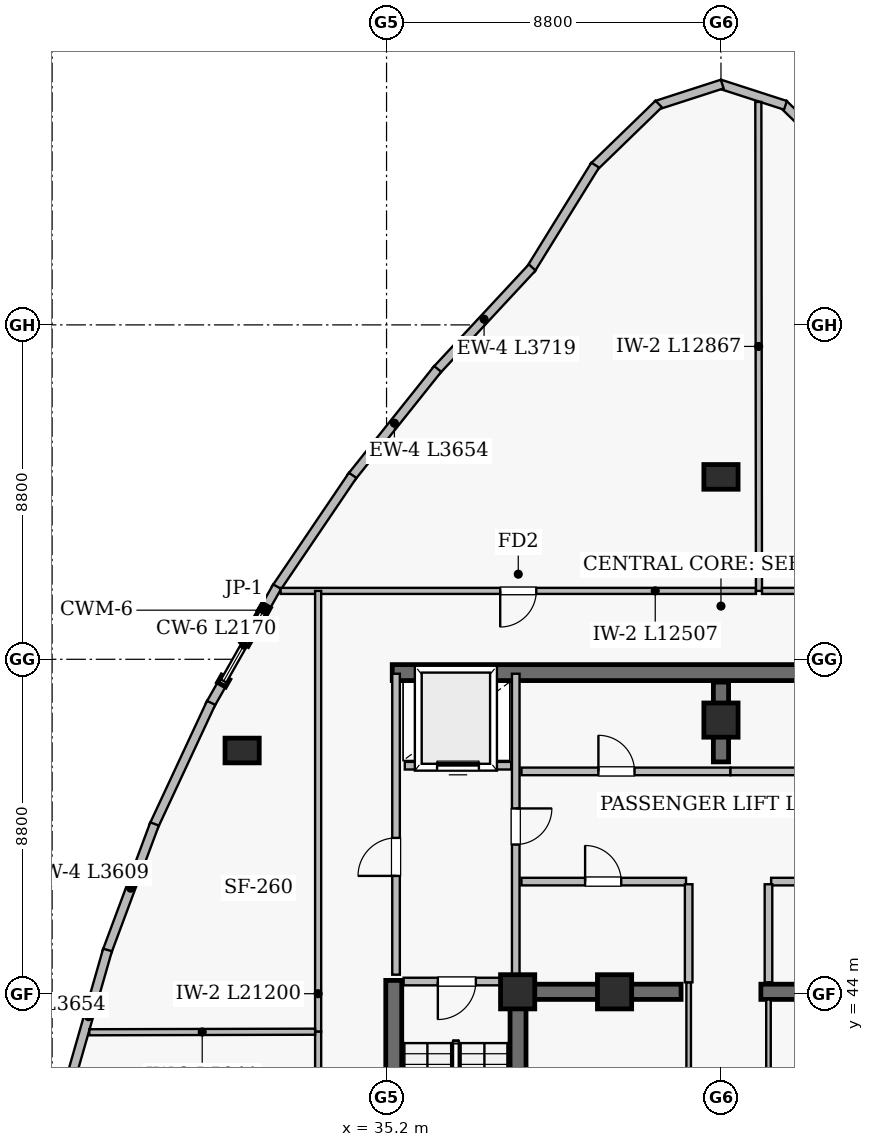
"""IFC4 building model, lengths in metres.
Left out: names, types, materials, properties, quantities, classifications, styles, units other than length and angle.
Written with IfcOpenShell. Run it as: python <this file> out.ifc"""

import sys

from ifc_helpers import new_model, si_unit, direction, frame, frame_2d, origin, origin_2d, place, context, subcontext, project, spatial, rectangle, extrude, element, fill, save


model = new_model("IFC4")
c1 = context("Model", 3, precision=1e-05, world=origin(), true_north=direction((0.0, 1.0)))
c2 = subcontext(c1, "Body", "Model", "MODEL_VIEW")
j1 = project(units=[si_unit("LENGTHUNIT", "METRE"), si_unit("PLANEANGLEUNIT", "RADIAN")], contexts=[c1])
p1 = place(None, origin())
s1 = spatial("IfcSite", under=j1, at=p1, CompositionType="ELEMENT")
p2 = place(p1, origin())
s2 = spatial("IfcBuilding", under=s1, at=p2, CompositionType="ELEMENT")
p3 = place(p2, frame((0.0, 0.0, 306.8)))
s3 = spatial("IfcBuildingStorey", under=s2, at=p3, CompositionType="ELEMENT", Elevation=306.8)
p4 = place(p3, frame((35.35, 52.45, 0.0), z_axis=(0.0, 0.0, 1.0), x_axis=(1.0, 0.0, 0.0)))
e1 = element("IfcWall", 1, at=p4, inside=s3, PredefinedType="SHEAR", context=c2, shape_type="SweptSolid", body=[
    extrude(rectangle(XDim=17.3, YDim=0.42, at=frame_2d((8.65, 0.0))), origin(), (0.0, 0.0, 1.0), 5.74),
])
p5 = place(p3, frame((35.39, 35.18, 0.0), z_axis=(0.0, 0.0, 1.0), x_axis=(0.0, 1.0, 0.0)))
e2 = element("IfcWall", 2, at=p5, inside=s3, PredefinedType="SHEAR", context=c2, shape_type="SweptSolid", body=[
    extrude(rectangle(XDim=9.17, YDim=0.42, at=frame_2d((4.585, 0.0))), origin(), (0.0, 0.0, 1.0), 5.74),
])
p6 = place(p3, frame((38.66, 35.4, 0.0), z_axis=(0.0, 0.0, 1.0), x_axis=(0.0, 1.0, 0.0)))
e3 = element("IfcWall", 3, at=p6, inside=s3, PredefinedType="SHEAR", context=c2, shape_type="SweptSolid", body=[
    extrude(rectangle(XDim=8.95, YDim=0.42, at=frame_2d((4.475, 0.0))), origin(), (0.0, 0.0, 1.0), 5.74),
])
p7 = place(p3, frame((44.0, 50.1, 0.0), z_axis=(0.0, 0.0, 1.0), x_axis=(0.0, 1.0, 0.0)))
e4 = element("IfcWall", 4, at=p7, inside=s3, PredefinedType="SHEAR", context=c2, shape_type="SweptSolid", body=[
    extrude(rectangle(XDim=2.1, YDim=0.4, at=frame_2d((1.05, 0.0))), origin(), (0.0, 0.0, 1.0), 5.74),
])
for number, where, z_axis, x_axis in (
    (5, (38.75, 44.05, 0.0), (0.0, 0.0, 1.0), (1.0, 0.0, 0.0)),
    (6, (45.05, 44.05, 0.0), (0.0, 0.0, 1.0), (1.0, 0.0, 0.0)),
):
    element("IfcWall", number, at=place(p3, frame(where, z_axis=z_axis, x_axis=x_axis)), inside=s3, PredefinedType="SHEAR", context=c2, shape_type="SweptSolid", body=[
        extrude(rectangle(XDim=4.2, YDim=0.4, at=frame_2d((2.1, 0.0))), origin(), (0.0, 0.0, 1.0), 5.74),
    ])
for number, where, z_axis, x_axis in (
    (7, (38.65, 44.05, 0.0), (0.0, 0.0, 1.0), (1.0, 0.0, 0.0)),
    (8, (44.0, 51.2, 0.0), (0.0, 0.0, 1.0), (1.0, 0.0, 0.0)),
    (9, (41.2, 44.05, 0.0), (0.0, 0.0, 1.0), (1.0, 0.0, 0.0)),
):
    element("IfcColumn", number, at=place(p3, frame(where, z_axis=z_axis, x_axis=x_axis)), inside=s3, PredefinedType="COLUMN", context=c2, shape_type="SweptSolid", body=[
        extrude(rectangle(XDim=0.9, YDim=0.9, at=origin_2d()), origin(), (0.0, 0.0, 1.0), 6.0),
    ])
for number, where, z_axis, x_axis in (
    (10, (44.0, 57.6, 0.0), (0.0, 0.0, 1.0), (1.0, 0.0, 0.0)),
    (11, (31.4, 50.4, 0.0), (0.0, 0.0, 1.0), (1.0, 0.0, 0.0)),
):
    element("IfcColumn", number, at=place(p3, frame(where, z_axis=z_axis, x_axis=x_axis)), inside=s3, PredefinedType="COLUMN", context=c2, shape_type="SweptSolid", body=[
        extrude(rectangle(XDim=0.9, YDim=0.65, at=origin_2d()), origin(), (0.0, 0.0, 1.0), 6.0),
    ])
p8 = place(p3, frame((47.352, 65.751, 0.0), z_axis=(0.0, 0.0, 1.0), x_axis=(-0.717711443968, 0.69634063733, 0.0)))
e12 = element("IfcWall", 12, at=p8, inside=s3, PredefinedType="SOLIDWALL", context=c2, shape_type="SweptSolid", body=[
    extrude(rectangle(XDim=2.388, YDim=0.24, at=frame_2d((1.194, 0.0))), origin(), (0.0, 0.0, 1.0), 5.74),
])
for number, where, z_axis, x_axis in (
    (13, (45.697, 67.378, 0.0), (0.0, 0.0, 1.0), (-0.952, 0.308, 0.0)),
    (14, (44.033, 67.938, 0.0), (0.0, 0.0, 1.0), (-0.952, -0.308, 0.0)),
):
    element("IfcWall", number, at=place(p3, frame(where, z_axis=z_axis, x_axis=x_axis)), inside=s3, PredefinedType="SOLIDWALL", context=c2, shape_type="SweptSolid", body=[
        extrude(rectangle(XDim=1.818, YDim=0.24, at=frame_2d((0.909, 0.0))), origin(), (0.0, 0.0, 1.0), 5.74),
    ])
p9 = place(p3, frame((42.361, 67.414, 0.0), z_axis=(0.0, 0.0, 1.0), x_axis=(-0.717711443968, -0.69634063733, 0.0)))
e15 = element("IfcWall", 15, at=p9, inside=s3, PredefinedType="SOLIDWALL", context=c2, shape_type="SweptSolid", body=[
    extrude(rectangle(XDim=2.388, YDim=0.24, at=frame_2d((1.194, 0.0))), origin(), (0.0, 0.0, 1.0), 5.74),
])
p10 = place(p3, frame((40.691, 65.805, 0.0), z_axis=(0.0, 0.0, 1.0), x_axis=(-0.526110187608, -0.850416410058, 0.0)))
e16 = element("IfcWall", 16, at=p10, inside=s3, PredefinedType="SOLIDWALL", context=c2, shape_type="SweptSolid", body=[
    extrude(rectangle(XDim=3.233, YDim=0.24, at=frame_2d((1.616, 0.0))), origin(), (0.0, 0.0, 1.0), 5.74),
])
p11 = place(p3, frame((39.033, 63.112, 0.0), z_axis=(0.0, 0.0, 1.0), x_axis=(-0.68087147599, -0.732402917241, 0.0)))
e17 = element("IfcWall", 17, at=p11, inside=s3, PredefinedType="SOLIDWALL", context=c2, shape_type="SweptSolid", body=[
    extrude(rectangle(XDim=3.719, YDim=0.24, at=frame_2d((1.859, 0.0))), origin(), (0.0, 0.0, 1.0), 5.74),
])
p12 = place(p3, frame((36.546, 60.441, 0.0), z_axis=(0.0, 0.0, 1.0), x_axis=(-0.623626980574, -0.781722066402, 0.0)))
e18 = element("IfcWall", 18, at=p12, inside=s3, PredefinedType="SOLIDWALL", context=c2, shape_type="SweptSolid", body=[
    extrude(rectangle(XDim=3.654, YDim=0.24, at=frame_2d((1.827, 0.0))), origin(), (0.0, 0.0, 1.0), 5.74),
])
p13 = place(p3, frame((34.309, 57.641, 0.0), z_axis=(0.0, 0.0, 1.0), x_axis=(-0.560819727484, -0.827937940467, 0.0)))
e19 = element("IfcWall", 19, at=p13, inside=s3, PredefinedType="SOLIDWALL", context=c2, shape_type="SweptSolid", body=[
    extrude(rectangle(XDim=3.609, YDim=0.24, at=frame_2d((1.805, 0.0))), origin(), (0.0, 0.0, 1.0), 5.74),
])
p14 = place(p3, frame((32.322, 54.712, 0.0), z_axis=(0.0, 0.0, 1.0), x_axis=(-0.493563037143, -0.869710025449, 0.0)))
e20 = element("IfcWall", 20, at=p14, inside=s3, PredefinedType="SOLIDWALL", context=c2, shape_type="SweptSolid", body=[
    extrude(rectangle(XDim=0.705, YDim=0.24, at=frame_2d((0.353, 0.0))), origin(), (0.0, 0.0, 1.0), 5.74),
])
p15 = place(p3, frame((30.923, 52.246, 0.0), z_axis=(0.0, 0.0, 1.0), x_axis=(-0.49347941801, -0.869757474242, 0.0)))
e21 = element("IfcWall", 21, at=p15, inside=s3, PredefinedType="SOLIDWALL", context=c2, shape_type="SweptSolid", body=[
    extrude(rectangle(XDim=0.752, YDim=0.24, at=frame_2d((0.376, 0.0))), origin(), (0.0, 0.0, 1.0), 5.74),
])
p16 = place(p3, frame((30.584, 51.654, 0.0), z_axis=(0.0, 0.0, 1.0), x_axis=(-0.422322757118, -0.906445524464, 0.0)))
e22 = element("IfcWall", 22, at=p16, inside=s3, PredefinedType="SOLIDWALL", context=c2, shape_type="SweptSolid", body=[
    extrude(rectangle(XDim=3.587, YDim=0.24, at=frame_2d((1.793, 0.0))), origin(), (0.0, 0.0, 1.0), 5.74),
])
p17 = place(p3, frame((29.096, 48.467, 0.0), z_axis=(0.0, 0.0, 1.0), x_axis=(-0.349054279873, -0.937102507574, 0.0)))
e23 = element("IfcWall", 23, at=p17, inside=s3, PredefinedType="SOLIDWALL", context=c2, shape_type="SweptSolid", body=[
    extrude(rectangle(XDim=3.609, YDim=0.24, at=frame_2d((1.805, 0.0))), origin(), (0.0, 0.0, 1.0), 5.74),
])
p18 = place(p3, frame((27.858, 45.152, 0.0), z_axis=(0.0, 0.0, 1.0), x_axis=(-0.274897629025, -0.961473501224, 0.0)))
e24 = element("IfcWall", 24, at=p18, inside=s3, PredefinedType="SOLIDWALL", context=c2, shape_type="SweptSolid", body=[
    extrude(rectangle(XDim=3.654, YDim=0.24, at=frame_2d((1.827, 0.0))), origin(), (0.0, 0.0, 1.0), 5.74),
])
p19 = place(p3, frame((44.92, 54.6, 0.0), z_axis=(0.0, 0.0, 1.0), x_axis=(-1.0, 0.0, 0.0)))
e25 = element("IfcWall", 25, at=p19, inside=s3, PredefinedType="SOLIDWALL", context=c2, shape_type="SweptSolid", body=[
    extrude(rectangle(XDim=12.507, YDim=0.16, at=frame_2d((6.253, 0.0))), origin(), (0.0, 0.0, 1.0), 4.828),
])
p20 = place(p19, frame((5.779, 0.0, 0.0)))
e26 = element("IfcOpeningElement", 26, at=p20, cuts=e25, PredefinedType="OPENING", context=c2, shape_type="SweptSolid", body=[
    extrude(rectangle(XDim=0.95, YDim=2.15, at=frame_2d((0.475, 1.075))), frame((0.0, 0.09, 0.0), z_axis=(0.0, -1.0, 0.0), x_axis=(1.0, 0.0, 0.0)), (0.0, 0.0, 1.0), 0.18),
])
p21 = place(p3, frame((43.15, 35.6, 0.0), z_axis=(0.0, 0.0, 1.0), x_axis=(0.0, 1.0, 0.0)))
e27 = element("IfcWall", 27, at=p21, inside=s3, PredefinedType="PARTITIONING", context=c2, shape_type="SweptSolid", body=[
    extrude(rectangle(XDim=8.7, YDim=0.12, at=frame_2d((4.35, 0.0))), origin(), (0.0, 0.0, 1.0), 5.74),
])
p22 = place(p21, frame((3.625, 0.0, 0.0)))
e28 = element("IfcOpeningElement", 28, at=p22, cuts=e27, PredefinedType="OPENING", context=c2, shape_type="SweptSolid", body=[
    extrude(rectangle(XDim=0.95, YDim=2.1, at=frame_2d((0.475, 1.05))), frame((0.0, 0.07, 0.0), z_axis=(0.0, -1.0, 0.0), x_axis=(1.0, 0.0, 0.0)), (0.0, 0.0, 1.0), 0.14),
])
p23 = place(p3, frame((45.25, 35.6, 0.0), z_axis=(0.0, 0.0, 1.0), x_axis=(0.0, 1.0, 0.0)))
e29 = element("IfcWall", 29, at=p23, inside=s3, PredefinedType="PARTITIONING", context=c2, shape_type="SweptSolid", body=[
    extrude(rectangle(XDim=8.25, YDim=0.12, at=frame_2d((4.125, 0.0))), origin(), (0.0, 0.0, 1.0), 5.74),
])
p24 = place(p23, frame((3.625, 0.0, 0.0)))
e30 = element("IfcOpeningElement", 30, at=p24, cuts=e29, PredefinedType="OPENING", context=c2, shape_type="SweptSolid", body=[
    extrude(rectangle(XDim=0.95, YDim=2.1, at=frame_2d((0.475, 1.05))), frame((0.0, 0.07, 0.0), z_axis=(0.0, -1.0, 0.0), x_axis=(1.0, 0.0, 0.0)), (0.0, 0.0, 1.0), 0.14),
])
p25 = place(p3, frame((35.45, 44.5, 0.0), z_axis=(0.0, 0.0, 1.0), x_axis=(0.0, 1.0, 0.0)))
e31 = element("IfcWall", 31, at=p25, inside=s3, PredefinedType="SOLIDWALL", context=c2, shape_type="SweptSolid", body=[
    extrude(rectangle(XDim=7.92, YDim=0.2, at=frame_2d((3.96, 0.0))), origin(), (0.0, 0.0, 1.0), 5.74),
])
p26 = place(p25, frame((2.6, 0.0, 0.0)))
e32 = element("IfcOpeningElement", 32, at=p26, cuts=e31, PredefinedType="OPENING", context=c2, shape_type="SweptSolid", body=[
    extrude(rectangle(XDim=1.0, YDim=2.15, at=frame_2d((0.5, 1.075))), frame((0.0, 0.11, 0.0), z_axis=(0.0, -1.0, 0.0), x_axis=(1.0, 0.0, 0.0)), (0.0, 0.0, 1.0), 0.22),
])
p27 = place(p3, frame((38.6, 44.5, 0.0), z_axis=(0.0, 0.0, 1.0), x_axis=(0.0, 1.0, 0.0)))
e33 = element("IfcWall", 33, at=p27, inside=s3, PredefinedType="SOLIDWALL", context=c2, shape_type="SweptSolid", body=[
    extrude(rectangle(XDim=7.92, YDim=0.2, at=frame_2d((3.96, 0.0))), origin(), (0.0, 0.0, 1.0), 5.74),
])
p28 = place(p27, frame((3.425, 0.0, 0.0)))
e34 = element("IfcOpeningElement", 34, at=p28, cuts=e33, PredefinedType="OPENING", context=c2, shape_type="SweptSolid", body=[
    extrude(rectangle(XDim=0.95, YDim=2.15, at=frame_2d((0.475, 1.075))), frame((0.0, 0.11, 0.0), z_axis=(0.0, -1.0, 0.0), x_axis=(1.0, 0.0, 0.0)), (0.0, 0.0, 1.0), 0.22),
])
p29 = place(p3, frame((38.75, 49.85, 0.0), z_axis=(0.0, 0.0, 1.0), x_axis=(1.0, 0.0, 0.0)))
e35 = element("IfcWall", 35, at=p29, inside=s3, PredefinedType="SOLIDWALL", context=c2, shape_type="SweptSolid", body=[
    extrude(rectangle(XDim=5.5, YDim=0.2, at=frame_2d((2.75, 0.0))), origin(), (0.0, 0.0, 1.0), 5.74),
])
p30 = place(p29, frame((2.025, 0.0, 0.0)))
e36 = element("IfcOpeningElement", 36, at=p30, cuts=e35, PredefinedType="OPENING", context=c2, shape_type="SweptSolid", body=[
    extrude(rectangle(XDim=0.95, YDim=2.15, at=frame_2d((0.475, 1.075))), frame((0.0, 0.11, 0.0), z_axis=(0.0, -1.0, 0.0), x_axis=(1.0, 0.0, 0.0)), (0.0, 0.0, 1.0), 0.22),
])
p31 = place(p3, frame((44.25, 49.85, 0.0), z_axis=(0.0, 0.0, 1.0), x_axis=(1.0, 0.0, 0.0)))
e37 = element("IfcWall", 37, at=p31, inside=s3, PredefinedType="SOLIDWALL", context=c2, shape_type="SweptSolid", body=[
    extrude(rectangle(XDim=5.0, YDim=0.2, at=frame_2d((2.5, 0.0))), origin(), (0.0, 0.0, 1.0), 4.828),
])
p32 = place(p31, frame((2.025, 0.0, 0.0)))
e38 = element("IfcOpeningElement", 38, at=p32, cuts=e37, PredefinedType="OPENING", context=c2, shape_type="SweptSolid", body=[
    extrude(rectangle(XDim=0.95, YDim=2.15, at=frame_2d((0.475, 1.075))), frame((0.0, 0.11, 0.0), z_axis=(0.0, -1.0, 0.0), x_axis=(1.0, 0.0, 0.0)), (0.0, 0.0, 1.0), 0.22),
])
p33 = place(p3, frame((38.75, 46.95, 0.0), z_axis=(0.0, 0.0, 1.0), x_axis=(1.0, 0.0, 0.0)))
e39 = element("IfcWall", 39, at=p33, inside=s3, PredefinedType="SOLIDWALL", context=c2, shape_type="SweptSolid", body=[
    extrude(rectangle(XDim=4.33, YDim=0.2, at=frame_2d((2.165, 0.0))), origin(), (0.0, 0.0, 1.0), 5.74),
])
p34 = place(p33, frame((1.675, 0.0, 0.0)))
e40 = element("IfcOpeningElement", 40, at=p34, cuts=e39, PredefinedType="OPENING", context=c2, shape_type="SweptSolid", body=[
    extrude(rectangle(XDim=0.95, YDim=2.1, at=frame_2d((0.475, 1.05))), frame((0.0, 0.11, 0.0), z_axis=(0.0, -1.0, 0.0), x_axis=(1.0, 0.0, 0.0)), (0.0, 0.0, 1.0), 0.22),
])
p35 = place(p3, frame((45.32, 46.95, 0.0), z_axis=(0.0, 0.0, 1.0), x_axis=(1.0, 0.0, 0.0)))
e41 = element("IfcWall", 41, at=p35, inside=s3, PredefinedType="SOLIDWALL", context=c2, shape_type="SweptSolid", body=[
    extrude(rectangle(XDim=3.93, YDim=0.2, at=frame_2d((1.965, 0.0))), origin(), (0.0, 0.0, 1.0), 4.828),
])
p36 = place(p35, frame((1.475, 0.0, 0.0)))
e42 = element("IfcOpeningElement", 42, at=p36, cuts=e41, PredefinedType="OPENING", context=c2, shape_type="SweptSolid", body=[
    extrude(rectangle(XDim=0.95, YDim=2.1, at=frame_2d((0.475, 1.05))), frame((0.0, 0.11, 0.0), z_axis=(0.0, -1.0, 0.0), x_axis=(1.0, 0.0, 0.0)), (0.0, 0.0, 1.0), 0.22),
])
p37 = place(p3, frame((35.65, 44.32, 0.0), z_axis=(0.0, 0.0, 1.0), x_axis=(1.0, 0.0, 0.0)))
e43 = element("IfcWall", 43, at=p37, inside=s3, PredefinedType="SOLIDWALL", context=c2, shape_type="SweptSolid", body=[
    extrude(rectangle(XDim=2.8, YDim=0.2, at=frame_2d((1.4, 0.0))), origin(), (0.0, 0.0, 1.0), 5.74),
])
p38 = place(p37, frame((0.9, 0.0, 0.0)))
e44 = element("IfcOpeningElement", 44, at=p38, cuts=e43, PredefinedType="OPENING", context=c2, shape_type="SweptSolid", body=[
    extrude(rectangle(XDim=1.0, YDim=2.15, at=frame_2d((0.5, 1.075))), frame((0.0, 0.11, 0.0), z_axis=(0.0, -1.0, 0.0), x_axis=(1.0, 0.0, 0.0)), (0.0, 0.0, 1.0), 0.22),
])
p39 = place(p3, frame((35.68, 50.0, 0.0), z_axis=(0.0, 0.0, 1.0), x_axis=(1.0, 0.0, 0.0)))
e45 = element("IfcWall", 45, at=p39, inside=s3, PredefinedType="SOLIDWALL", context=c2, shape_type="SweptSolid", body=[
    extrude(rectangle(XDim=2.8, YDim=0.2, at=frame_2d((1.4, 0.0))), origin(), (0.0, 0.0, 1.0), 5.74),
])
p40 = place(p39, frame((0.85, 0.0, 0.0)))
e46 = element("IfcOpeningElement", 46, at=p40, cuts=e45, PredefinedType="OPENING", context=c2, shape_type="SweptSolid", body=[
    extrude(rectangle(XDim=1.1, YDim=2.15, at=frame_2d((0.55, 1.075))), frame((0.0, 0.11, 0.0), z_axis=(0.0, -1.0, 0.0), x_axis=(1.0, 0.0, 0.0)), (0.0, 0.0, 1.0), 0.22),
])
p41 = place(p3, frame((45.0, 54.6, 0.0), z_axis=(0.0, 0.0, 1.0), x_axis=(-0.001328196464, 0.999999117947, 0.0)))
e47 = element("IfcWall", 47, at=p41, inside=s3, PredefinedType="SOLIDWALL", context=c2, shape_type="SweptSolid", body=[
    extrude(rectangle(XDim=12.867, YDim=0.16, at=frame_2d((6.434, 0.0))), origin(), (0.0, 0.0, 1.0), 4.828),
])
p42 = place(p3, frame((33.4, 54.6, 0.0), z_axis=(0.0, 0.0, 1.0), x_axis=(0.0, -1.0, 0.0)))
e48 = element("IfcWall", 48, at=p42, inside=s3, PredefinedType="SOLIDWALL", context=c2, shape_type="SweptSolid", body=[
    extrude(rectangle(XDim=11.6, YDim=0.16, at=frame_2d((5.8, 0.0))), origin(), (0.0, 0.0, 1.0), 4.828),
])
p43 = place(p3, frame((33.4, 43.0, 0.0), z_axis=(0.0, 0.0, 1.0), x_axis=(0.0, -1.0, 0.0)))
e49 = element("IfcWall", 49, at=p43, inside=s3, PredefinedType="SOLIDWALL", context=c2, shape_type="SweptSolid", body=[
    extrude(rectangle(XDim=9.6, YDim=0.16, at=frame_2d((4.8, 0.0))), origin(), (0.0, 0.0, 1.0), 4.828),
])
p44 = place(p3, frame((52.47, 54.6, 0.0), z_axis=(0.0, 0.0, 1.0), x_axis=(-1.0, 0.0, 0.0)))
e50 = element("IfcWall", 50, at=p44, inside=s3, PredefinedType="SOLIDWALL", context=c2, shape_type="SweptSolid", body=[
    extrude(rectangle(XDim=7.39, YDim=0.16, at=frame_2d((3.695, 0.0))), origin(), (0.0, 0.0, 1.0), 4.828),
])
p45 = place(p3, frame((33.32, 43.0, 0.0), z_axis=(0.0, 0.0, 1.0), x_axis=(-0.999996858298, -0.00250666975, 0.0)))
e51 = element("IfcWall", 51, at=p45, inside=s3, PredefinedType="SOLIDWALL", context=c2, shape_type="SweptSolid", body=[
    extrude(rectangle(XDim=5.941, YDim=0.16, at=frame_2d((2.971, 0.0))), origin(), (0.0, 0.0, 1.0), 4.828),
])
for number, where, z_axis, x_axis in (
    (52, (43.15, 44.3, 0.0), (0.0, 0.0, 1.0), (0.0, 1.0, 0.0)),
    (53, (45.25, 44.3, 0.0), (0.0, 0.0, 1.0), (0.0, 1.0, 0.0)),
):
    element("IfcWall", number, at=place(p3, frame(where, z_axis=z_axis, x_axis=x_axis)), inside=s3, PredefinedType="SOLIDWALL", context=c2, shape_type="SweptSolid", body=[
        extrude(rectangle(XDim=2.58, YDim=0.2, at=frame_2d((1.29, 0.0))), origin(), (0.0, 0.0, 1.0), 5.74),
    ])
p46 = place(p38, frame((1.0, 0.0, 0.0), z_axis=(0.0, 0.0, 1.0), x_axis=(-1.0, 0.0, 0.0)))
e54 = element("IfcDoor", 54, at=p46, inside=s3, OperationType="SINGLE_SWING_LEFT", PredefinedType="DOOR", context=c2, shape_type="SweptSolid", body=[
    extrude(rectangle(XDim=1.0, YDim=2.15, at=frame_2d((0.5, 1.075))), frame((0.0, 0.025, 0.0), z_axis=(0.0, -1.0, 0.0), x_axis=(1.0, 0.0, 0.0)), (0.0, 0.0, 1.0), 0.05),
])
fill(e44, e54)
p47 = place(p26, origin())
e55 = element("IfcDoor", 55, at=p47, inside=s3, OperationType="SINGLE_SWING_LEFT", PredefinedType="DOOR", context=c2, shape_type="SweptSolid", body=[
    extrude(rectangle(XDim=1.0, YDim=2.15, at=frame_2d((0.5, 1.075))), frame((0.0, 0.025, 0.0), z_axis=(0.0, -1.0, 0.0), x_axis=(1.0, 0.0, 0.0)), (0.0, 0.0, 1.0), 0.05),
])
fill(e32, e55)
p48 = place(p28, frame((0.95, 0.0, 0.0), z_axis=(0.0, 0.0, 1.0), x_axis=(-1.0, 0.0, 0.0)))
e56 = element("IfcDoor", 56, at=p48, inside=s3, OperationType="SINGLE_SWING_RIGHT", PredefinedType="DOOR", context=c2, shape_type="SweptSolid", body=[
    extrude(rectangle(XDim=0.95, YDim=2.15, at=frame_2d((0.475, 1.075))), frame((0.0, 0.025, 0.0), z_axis=(0.0, -1.0, 0.0), x_axis=(1.0, 0.0, 0.0)), (0.0, 0.0, 1.0), 0.05),
])
fill(e34, e56)
p49 = place(p40, origin())
e57 = element("IfcDoor", 57, at=p49, inside=s3, OperationType="SLIDING_TO_LEFT", PredefinedType="DOOR", context=c2, shape_type="SweptSolid", body=[
    extrude(rectangle(XDim=1.1, YDim=2.15, at=frame_2d((0.55, 1.075))), frame((0.0, 0.025, 0.0), z_axis=(0.0, -1.0, 0.0), x_axis=(1.0, 0.0, 0.0)), (0.0, 0.0, 1.0), 0.05),
])
fill(e46, e57)
p50 = place(p30, origin())
e58 = element("IfcDoor", 58, at=p50, inside=s3, OperationType="SINGLE_SWING_LEFT", PredefinedType="DOOR", context=c2, shape_type="SweptSolid", body=[
    extrude(rectangle(XDim=0.95, YDim=2.15, at=frame_2d((0.475, 1.075))), frame((0.0, 0.025, 0.0), z_axis=(0.0, -1.0, 0.0), x_axis=(1.0, 0.0, 0.0)), (0.0, 0.0, 1.0), 0.05),
])
fill(e36, e58)
p51 = place(p34, origin())
e59 = element("IfcDoor", 59, at=p51, inside=s3, OperationType="SINGLE_SWING_LEFT", PredefinedType="DOOR", context=c2, shape_type="SweptSolid", body=[
    extrude(rectangle(XDim=0.95, YDim=2.1, at=frame_2d((0.475, 1.05))), frame((0.0, 0.025, 0.0), z_axis=(0.0, -1.0, 0.0), x_axis=(1.0, 0.0, 0.0)), (0.0, 0.0, 1.0), 0.05),
])
fill(e40, e59)
p52 = place(p20, origin())
e60 = element("IfcDoor", 60, at=p52, inside=s3, OperationType="SINGLE_SWING_RIGHT", PredefinedType="DOOR", context=c2, shape_type="SweptSolid", body=[
    extrude(rectangle(XDim=0.95, YDim=2.15, at=frame_2d((0.475, 1.075))), frame((0.0, 0.025, 0.0), z_axis=(0.0, -1.0, 0.0), x_axis=(1.0, 0.0, 0.0)), (0.0, 0.0, 1.0), 0.05),
])
fill(e26, e60)
save(model, sys.argv[1])
